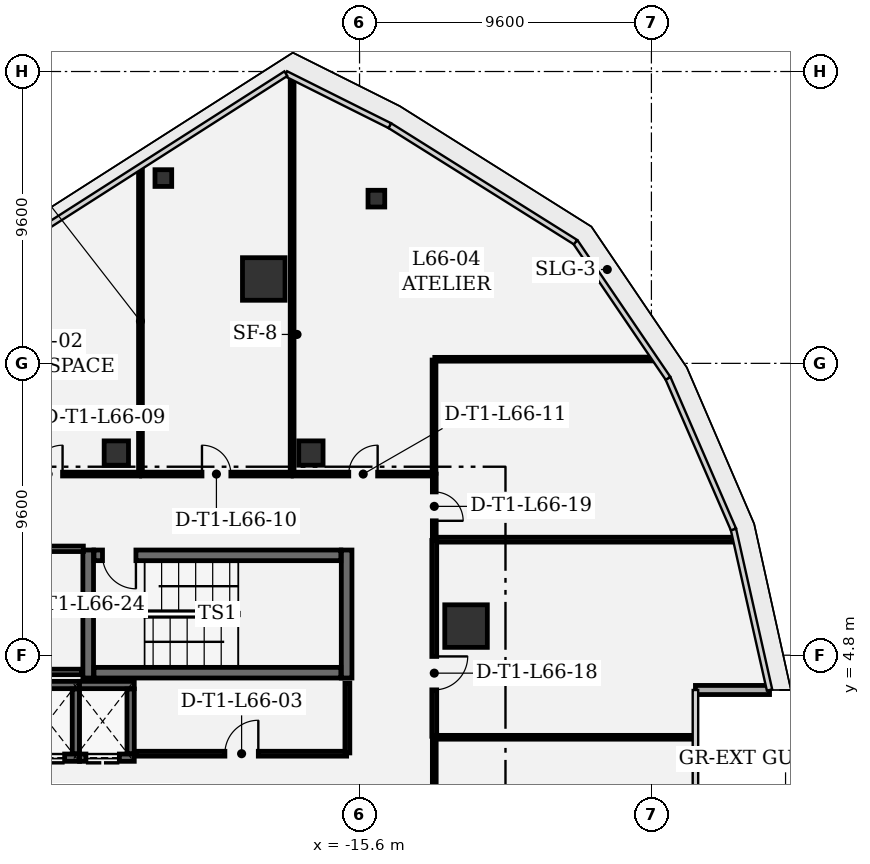
"""IFC4 building model, lengths in metres.
Left out: names, types, materials, properties, quantities, classifications, styles, units other than length and angle.
Written with IfcOpenShell. Run it as: python <this file> out.ifc"""

import sys

from ifc_helpers import new_model, si_unit, direction, frame, frame_2d, origin, origin_2d, place, context, subcontext, project, spatial, rectangle, extrude, element, fill, save


model = new_model("IFC4")
c1 = context("Model", 3, precision=1e-05, world=origin(), true_north=direction((0.0, 1.0)))
c2 = subcontext(c1, "Body", "Model", "MODEL_VIEW")
j1 = project(units=[si_unit("LENGTHUNIT", "METRE"), si_unit("PLANEANGLEUNIT", "RADIAN")], contexts=[c1])
p1 = place(None, origin())
s1 = spatial("IfcSite", under=j1, at=p1, CompositionType="ELEMENT")
p2 = place(p1, origin())
s2 = spatial("IfcBuilding", under=s1, at=p2, CompositionType="ELEMENT")
p3 = place(p2, frame((0.0, 0.0, 285.0)))
s3 = spatial("IfcBuildingStorey", under=s2, at=p3, CompositionType="ELEMENT", Elevation=285.0)
for number, where, z_axis, x_axis in (
    (1, (-12.097, 5.758, 0.0), (0.0, 0.0, 1.0), (1.0, 0.0, 0.0)),
    (2, (-18.75, 17.176, 0.0), (0.0, 0.0, 1.0), (1.0, 0.0, 0.0)),
):
    element("IfcColumn", number, at=place(p3, frame(where, z_axis=z_axis, x_axis=x_axis)), inside=s3, PredefinedType="COLUMN", context=c2, shape_type="SweptSolid", body=[
        extrude(rectangle(XDim=1.4, YDim=1.4, at=origin_2d()), origin(), (0.0, 0.0, 1.0), 4.2),
    ])
for number, where, z_axis, x_axis in (
    (3, (-23.6, 11.45, 0.0), (0.0, 0.0, 1.0), (1.0, 0.0, 0.0)),
    (4, (-17.2, 11.45, 0.0), (0.0, 0.0, 1.0), (1.0, 0.0, 0.0)),
):
    element("IfcColumn", number, at=place(p3, frame(where, z_axis=z_axis, x_axis=x_axis)), inside=s3, PredefinedType="COLUMN", context=c2, shape_type="SweptSolid", body=[
        extrude(rectangle(XDim=0.8, YDim=0.8, at=origin_2d()), origin(), (0.0, 0.0, 1.0), 4.2),
    ])
for number, where, z_axis, x_axis in (
    (5, (-22.053, 20.495, 0.0), (0.0, 0.0, 1.0), (1.0, 0.0, 0.0)),
    (6, (-15.046, 19.818, 0.0), (0.0, 0.0, 1.0), (1.0, 0.0, 0.0)),
):
    element("IfcColumn", number, at=place(p3, frame(where, z_axis=z_axis, x_axis=x_axis)), inside=s3, PredefinedType="COLUMN", context=c2, shape_type="SweptSolid", body=[
        extrude(rectangle(XDim=0.55, YDim=0.55, at=origin_2d()), origin(), (0.0, 0.0, 1.0), 4.2),
    ])
p4 = place(p3, frame((-4.552, 3.656, 0.0), z_axis=(0.0, 0.0, 1.0), x_axis=(1.0, 0.0, 0.0)))
e7 = element("IfcWall", 7, at=p4, inside=s3, PredefinedType="SOLIDWALL", context=c2, shape_type="SweptSolid", body=[
    extrude(rectangle(XDim=2.437, YDim=0.3, at=frame_2d((1.219, 0.0))), origin(), (0.0, 0.0, 1.0), 3.91),
])
for number, where, z_axis, x_axis in (
    (8, (-24.525, 8.26, 0.0), (0.0, 0.0, 1.0), (0.0, -1.0, 0.0)),
    (9, (-16.025, 4.05, 0.0), (0.0, 0.0, 1.0), (0.0, 1.0, 0.0)),
):
    element("IfcWall", number, at=place(p3, frame(where, z_axis=z_axis, x_axis=x_axis)), inside=s3, PredefinedType="SHEAR", context=c2, shape_type="SweptSolid", body=[
        extrude(rectangle(XDim=4.21, YDim=0.35, at=frame_2d((2.105, 0.0))), origin(), (0.0, 0.0, 1.0), 3.91),
    ])
p5 = place(p3, frame((-24.335, 4.225, 0.0), z_axis=(0.0, 0.0, 1.0), x_axis=(1.0, 0.0, 0.0)))
e10 = element("IfcWall", 10, at=p5, inside=s3, PredefinedType="SHEAR", context=c2, shape_type="SweptSolid", body=[
    extrude(rectangle(XDim=8.12, YDim=0.35, at=frame_2d((4.06, 0.0))), origin(), (0.0, 0.0, 1.0), 3.91),
])
p6 = place(p3, frame((-16.215, 8.085, 0.0), z_axis=(0.0, 0.0, 1.0), x_axis=(-1.0, 0.0, 0.0)))
e11 = element("IfcWall", 11, at=p6, inside=s3, PredefinedType="SHEAR", context=c2, shape_type="SweptSolid", body=[
    extrude(rectangle(XDim=8.12, YDim=0.35, at=frame_2d((4.06, 0.0))), origin(), (0.0, 0.0, 1.0), 3.91),
])
p7 = place(p6, frame((6.74, 0.0, 0.0)))
e12 = element("IfcOpeningElement", 12, at=p7, cuts=e11, PredefinedType="OPENING", context=c2, shape_type="SweptSolid", body=[
    extrude(rectangle(XDim=1.1, YDim=2.2, at=frame_2d((0.55, 1.1))), frame((0.0, 0.185, 0.0), z_axis=(0.0, -1.0, 0.0), x_axis=(1.0, 0.0, 0.0)), (0.0, 0.0, 1.0), 0.37),
])
p8 = place(p3, frame((-24.81, 1.43, 0.0), z_axis=(0.0, 0.0, 1.0), x_axis=(-1.0, 0.0, 0.0)))
e13 = element("IfcWall", 13, at=p8, inside=s3, PredefinedType="SHEAR", context=c2, shape_type="SweptSolid", body=[
    extrude(rectangle(XDim=2.08, YDim=0.24, at=frame_2d((1.04, 0.0))), origin(), (0.0, 0.0, 1.0), 3.91),
])
p9 = place(p8, frame((0.49, 0.0, 0.0)))
e14 = element("IfcOpeningElement", 14, at=p9, cuts=e13, PredefinedType="OPENING", context=c2, shape_type="SweptSolid", body=[
    extrude(rectangle(XDim=1.1, YDim=2.2, at=frame_2d((0.55, 1.1))), frame((0.0, 0.13, 0.0), z_axis=(0.0, -1.0, 0.0), x_axis=(1.0, 0.0, 0.0)), (0.0, 0.0, 1.0), 0.26),
])
p10 = place(p3, frame((-26.89, 3.82, 0.0), z_axis=(0.0, 0.0, 1.0), x_axis=(1.0, 0.0, 0.0)))
e15 = element("IfcWall", 15, at=p10, inside=s3, PredefinedType="SHEAR", context=c2, shape_type="SweptSolid", body=[
    extrude(rectangle(XDim=2.08, YDim=0.24, at=frame_2d((1.04, 0.0))), origin(), (0.0, 0.0, 1.0), 3.91),
])
p11 = place(p3, frame((-24.93, 3.688, 0.0), z_axis=(0.0, 0.0, 1.0), x_axis=(0.0, -1.0, 0.0)))
e16 = element("IfcWall", 16, at=p11, inside=s3, PredefinedType="SHEAR", context=c2, shape_type="SweptSolid", body=[
    extrude(rectangle(XDim=2.126, YDim=0.24, at=frame_2d((1.063, 0.0))), origin(), (0.0, 0.0, 1.0), 3.91),
])
p12 = place(p3, frame((-23.01, 1.43, 0.0), z_axis=(0.0, 0.0, 1.0), x_axis=(-1.0, 0.0, 0.0)))
e17 = element("IfcWall", 17, at=p12, inside=s3, PredefinedType="SHEAR", context=c2, shape_type="SweptSolid", body=[
    extrude(rectangle(XDim=1.8, YDim=0.24, at=frame_2d((0.9, 0.0))), origin(), (0.0, 0.0, 1.0), 3.91),
])
p13 = place(p12, frame((0.49, 0.0, 0.0)))
e18 = element("IfcOpeningElement", 18, at=p13, cuts=e17, PredefinedType="OPENING", context=c2, shape_type="SweptSolid", body=[
    extrude(rectangle(XDim=1.1, YDim=2.2, at=frame_2d((0.55, 1.1))), frame((0.0, 0.13, 0.0), z_axis=(0.0, -1.0, 0.0), x_axis=(1.0, 0.0, 0.0)), (0.0, 0.0, 1.0), 0.26),
])
p14 = place(p3, frame((-24.81, 3.82, 0.0), z_axis=(0.0, 0.0, 1.0), x_axis=(1.0, 0.0, 0.0)))
e19 = element("IfcWall", 19, at=p14, inside=s3, PredefinedType="SHEAR", context=c2, shape_type="SweptSolid", body=[
    extrude(rectangle(XDim=1.8, YDim=0.24, at=frame_2d((0.9, 0.0))), origin(), (0.0, 0.0, 1.0), 3.91),
])
p15 = place(p3, frame((-23.13, 3.688, 0.0), z_axis=(0.0, 0.0, 1.0), x_axis=(0.0, -1.0, 0.0)))
e20 = element("IfcWall", 20, at=p15, inside=s3, PredefinedType="SHEAR", context=c2, shape_type="SweptSolid", body=[
    extrude(rectangle(XDim=2.126, YDim=0.24, at=frame_2d((1.063, 0.0))), origin(), (0.0, 0.0, 1.0), 3.91),
])
p16 = place(p3, frame((-28.355, 4.25, 0.0), z_axis=(0.0, 0.0, 1.0), x_axis=(1.0, 0.0, 0.0)))
e21 = element("IfcWall", 21, at=p16, inside=s3, PredefinedType="PARTITIONING", context=c2, shape_type="SweptSolid", body=[
    extrude(rectangle(XDim=3.622, YDim=0.18, at=frame_2d((1.811, 0.0))), origin(), (0.0, 0.0, 1.0), 3.91),
])
p17 = place(p3, frame((-24.684, 8.3, 0.0), z_axis=(0.0, 0.0, 1.0), x_axis=(-1.0, 0.0, 0.0)))
e22 = element("IfcWall", 22, at=p17, inside=s3, PredefinedType="PARTITIONING", context=c2, shape_type="SweptSolid", body=[
    extrude(rectangle(XDim=3.671, YDim=0.18, at=frame_2d((1.835, 0.0))), origin(), (0.0, 0.0, 1.0), 3.529),
])
p18 = place(p17, frame((1.335, 0.0, 0.0)))
e23 = element("IfcOpeningElement", 23, at=p18, cuts=e22, PredefinedType="OPENING", context=c2, shape_type="SweptSolid", body=[
    extrude(rectangle(XDim=1.0, YDim=2.15, at=frame_2d((0.5, 1.075))), frame((0.0, 0.1, 0.0), z_axis=(0.0, -1.0, 0.0), x_axis=(1.0, 0.0, 0.0)), (0.0, 0.0, 1.0), 0.2),
])
p19 = place(p3, frame((-22.934, 1.56, 0.0), z_axis=(0.0, 0.0, 1.0), x_axis=(1.0, 0.0, 0.0)))
e24 = element("IfcWall", 24, at=p19, inside=s3, PredefinedType="PARTITIONING", context=c2, shape_type="SweptSolid", body=[
    extrude(rectangle(XDim=6.909, YDim=0.16, at=frame_2d((3.455, 0.0))), origin(), (0.0, 0.0, 1.0), 3.91),
])
p20 = place(p19, frame((2.905, 0.0, 0.0)))
e25 = element("IfcOpeningElement", 25, at=p20, cuts=e24, PredefinedType="OPENING", context=c2, shape_type="SweptSolid", body=[
    extrude(rectangle(XDim=1.1, YDim=2.15, at=frame_2d((0.55, 1.075))), frame((0.0, 0.09, 0.0), z_axis=(0.0, -1.0, 0.0), x_axis=(1.0, 0.0, 0.0)), (0.0, 0.0, 1.0), 0.18),
])
p21 = place(p3, frame((-16.0, 1.585, 0.0), z_axis=(0.0, 0.0, 1.0), x_axis=(0.0, 1.0, 0.0)))
e26 = element("IfcWall", 26, at=p21, inside=s3, PredefinedType="PARTITIONING", context=c2, shape_type="SweptSolid", body=[
    extrude(rectangle(XDim=2.302, YDim=0.16, at=frame_2d((1.151, 0.0))), origin(), (0.0, 0.0, 1.0), 3.91),
])
p22 = place(p3, frame((-28.855, 10.758, 0.0), z_axis=(0.0, 0.0, 1.0), x_axis=(1.0, 0.0, 0.0)))
e27 = element("IfcWall", 27, at=p22, inside=s3, PredefinedType="PARTITIONING", context=c2, shape_type="SweptSolid", body=[
    extrude(rectangle(XDim=6.025, YDim=0.125, at=frame_2d((3.012, 0.0))), origin(), (0.0, 0.0, 1.0), 3.13),
])
p23 = place(p22, frame((2.537, 0.0, 0.0)))
e28 = element("IfcOpeningElement", 28, at=p23, cuts=e27, PredefinedType="OPENING", context=c2, shape_type="SweptSolid", body=[
    extrude(rectangle(XDim=0.95, YDim=2.15, at=frame_2d((0.475, 1.075))), frame((0.0, 0.073, 0.0), z_axis=(0.0, -1.0, 0.0), x_axis=(1.0, 0.0, 0.0)), (0.0, 0.0, 1.0), 0.145),
])
p24 = place(p3, frame((-22.806, 10.783, 0.0), z_axis=(0.0, 0.0, 1.0), x_axis=(0.0, 1.0, 0.0)))
e29 = element("IfcWall", 29, at=p24, inside=s3, PredefinedType="PARTITIONING", context=c2, shape_type="SweptSolid", body=[
    extrude(rectangle(XDim=10.009, YDim=0.125, at=frame_2d((5.004, 0.0))), origin(), (0.0, 0.0, 1.0), 3.91),
])
p25 = place(p3, frame((-22.773, 10.758, 0.0), z_axis=(0.0, 0.0, 1.0), x_axis=(1.0, 0.0, 0.0)))
e30 = element("IfcWall", 30, at=p25, inside=s3, PredefinedType="PARTITIONING", context=c2, shape_type="SweptSolid", body=[
    extrude(rectangle(XDim=4.931, YDim=0.125, at=frame_2d((2.465, 0.0))), origin(), (0.0, 0.0, 1.0), 3.529),
])
p26 = place(p25, frame((1.99, 0.0, 0.0)))
e31 = element("IfcOpeningElement", 31, at=p26, cuts=e30, PredefinedType="OPENING", context=c2, shape_type="SweptSolid", body=[
    extrude(rectangle(XDim=0.95, YDim=2.15, at=frame_2d((0.475, 1.075))), frame((0.0, 0.073, 0.0), z_axis=(0.0, -1.0, 0.0), x_axis=(1.0, 0.0, 0.0)), (0.0, 0.0, 1.0), 0.145),
])
p27 = place(p3, frame((-17.817, 10.783, 0.0), z_axis=(0.0, 0.0, 1.0), x_axis=(0.0, 1.0, 0.0)))
e32 = element("IfcWall", 32, at=p27, inside=s3, PredefinedType="PARTITIONING", context=c2, shape_type="SweptSolid", body=[
    extrude(rectangle(XDim=12.962, YDim=0.125, at=frame_2d((6.481, 0.0))), origin(), (0.0, 0.0, 1.0), 3.13),
])
p28 = place(p3, frame((-17.785, 10.758, 0.0), z_axis=(0.0, 0.0, 1.0), x_axis=(1.0, 0.0, 0.0)))
e33 = element("IfcWall", 33, at=p28, inside=s3, PredefinedType="PARTITIONING", context=c2, shape_type="SweptSolid", body=[
    extrude(rectangle(XDim=4.61, YDim=0.125, at=frame_2d((2.305, 0.0))), origin(), (0.0, 0.0, 1.0), 3.529),
])
p29 = place(p28, frame((1.83, 0.0, 0.0)))
e34 = element("IfcOpeningElement", 34, at=p29, cuts=e33, PredefinedType="OPENING", context=c2, shape_type="SweptSolid", body=[
    extrude(rectangle(XDim=0.95, YDim=2.15, at=frame_2d((0.475, 1.075))), frame((0.0, 0.073, 0.0), z_axis=(0.0, -1.0, 0.0), x_axis=(1.0, 0.0, 0.0)), (0.0, 0.0, 1.0), 0.145),
])
p30 = place(p3, frame((-13.15, 10.783, 0.0), z_axis=(0.0, 0.0, 1.0), x_axis=(0.0, 1.0, 0.0)))
e35 = element("IfcWall", 35, at=p30, inside=s3, PredefinedType="PARTITIONING", context=c2, shape_type="SweptSolid", body=[
    extrude(rectangle(XDim=3.726, YDim=0.125, at=frame_2d((1.863, 0.0))), origin(), (0.0, 0.0, 1.0), 3.91),
])
p31 = place(p3, frame((-13.125, 14.534, 0.0), z_axis=(0.0, 0.0, 1.0), x_axis=(0.999999160366, 0.001295865779, 0.0)))
e36 = element("IfcWall", 36, at=p31, inside=s3, PredefinedType="PARTITIONING", context=c2, shape_type="SweptSolid", body=[
    extrude(rectangle(XDim=7.159, YDim=0.125, at=frame_2d((3.58, 0.0))), origin(), (0.0, 0.0, 1.0), 3.91),
])
p32 = place(p3, frame((-4.632, 2.101, 0.0), z_axis=(0.0, 0.0, 1.0), x_axis=(-1.0, 0.0, 0.0)))
e37 = element("IfcWall", 37, at=p32, inside=s3, PredefinedType="PARTITIONING", context=c2, shape_type="SweptSolid", body=[
    extrude(rectangle(XDim=8.485, YDim=0.125, at=frame_2d((4.243, 0.0))), origin(), (0.0, 0.0, 1.0), 3.91),
])
p33 = place(p3, frame((-13.142, 2.076, 0.0), z_axis=(0.0, 0.0, 1.0), x_axis=(0.0, -1.0, 0.0)))
e38 = element("IfcWall", 38, at=p33, inside=s3, PredefinedType="PARTITIONING", context=c2, shape_type="SweptSolid", body=[
    extrude(rectangle(XDim=7.493, YDim=0.125, at=frame_2d((3.746, 0.0))), origin(), (0.0, 0.0, 1.0), 3.91),
])
p34 = place(p33, frame((3.271, 0.0, 0.0)))
e39 = element("IfcOpeningElement", 39, at=p34, cuts=e38, PredefinedType="OPENING", context=c2, shape_type="SweptSolid", body=[
    extrude(rectangle(XDim=0.95, YDim=2.15, at=frame_2d((0.475, 1.075))), frame((0.0, 0.073, 0.0), z_axis=(0.0, -1.0, 0.0), x_axis=(1.0, 0.0, 0.0)), (0.0, 0.0, 1.0), 0.145),
])
p35 = place(p3, frame((-3.305, 8.601, 0.0), z_axis=(0.0, 0.0, 1.0), x_axis=(-1.0, 0.0, 0.0)))
e40 = element("IfcWall", 40, at=p35, inside=s3, PredefinedType="PARTITIONING", context=c2, shape_type="SweptSolid", body=[
    extrude(rectangle(XDim=9.812, YDim=0.16, at=frame_2d((4.906, 0.0))), origin(), (0.0, 0.0, 1.0), 3.91),
])
p36 = place(p3, frame((-13.142, 8.576, 0.0), z_axis=(0.0, 0.0, 1.0), x_axis=(0.0, -1.0, 0.0)))
e41 = element("IfcWall", 41, at=p36, inside=s3, PredefinedType="PARTITIONING", context=c2, shape_type="SweptSolid", body=[
    extrude(rectangle(XDim=6.442, YDim=0.16, at=frame_2d((3.221, 0.0))), origin(), (0.0, 0.0, 1.0), 3.13),
])
p37 = place(p36, frame((3.816, 0.0, 0.0)))
e42 = element("IfcOpeningElement", 42, at=p37, cuts=e41, PredefinedType="OPENING", context=c2, shape_type="SweptSolid", body=[
    extrude(rectangle(XDim=1.1, YDim=2.15, at=frame_2d((0.55, 1.075))), frame((0.0, 0.09, 0.0), z_axis=(0.0, -1.0, 0.0), x_axis=(1.0, 0.0, 0.0)), (0.0, 0.0, 1.0), 0.18),
])
p38 = place(p3, frame((-13.142, 10.758, 0.0), z_axis=(0.0, 0.0, 1.0), x_axis=(0.0, -1.0, 0.0)))
e43 = element("IfcWall", 43, at=p38, inside=s3, PredefinedType="PARTITIONING", context=c2, shape_type="SweptSolid", body=[
    extrude(rectangle(XDim=2.125, YDim=0.125, at=frame_2d((1.062, 0.0))), origin(), (0.0, 0.0, 1.0), 3.91),
])
p39 = place(p38, frame((0.587, 0.0, 0.0)))
e44 = element("IfcOpeningElement", 44, at=p39, cuts=e43, PredefinedType="OPENING", context=c2, shape_type="SweptSolid", body=[
    extrude(rectangle(XDim=0.95, YDim=2.15, at=frame_2d((0.475, 1.075))), frame((0.0, 0.073, 0.0), z_axis=(0.0, -1.0, 0.0), x_axis=(1.0, 0.0, 0.0)), (0.0, 0.0, 1.0), 0.145),
])
p40 = place(p7, origin())
e45 = element("IfcDoor", 45, at=p40, inside=s3, OperationType="SINGLE_SWING_LEFT", PredefinedType="DOOR", context=c2, shape_type="SweptSolid", body=[
    extrude(rectangle(XDim=1.1, YDim=2.2, at=frame_2d((0.55, 1.1))), frame((0.0, 0.025, 0.0), z_axis=(0.0, -1.0, 0.0), x_axis=(1.0, 0.0, 0.0)), (0.0, 0.0, 1.0), 0.05),
])
fill(e12, e45)
p41 = place(p9, origin())
e46 = element("IfcDoor", 46, at=p41, inside=s3, OperationType="DOUBLE_DOOR_SLIDING", PredefinedType="DOOR", context=c2, shape_type="SweptSolid", body=[
    extrude(rectangle(XDim=1.1, YDim=2.2, at=frame_2d((0.55, 1.1))), frame((0.0, 0.025, 0.0), z_axis=(0.0, -1.0, 0.0), x_axis=(1.0, 0.0, 0.0)), (0.0, 0.0, 1.0), 0.05),
])
fill(e14, e46)
p42 = place(p13, origin())
e47 = element("IfcDoor", 47, at=p42, inside=s3, OperationType="DOUBLE_DOOR_SLIDING", PredefinedType="DOOR", context=c2, shape_type="SweptSolid", body=[
    extrude(rectangle(XDim=1.1, YDim=2.2, at=frame_2d((0.55, 1.1))), frame((0.0, 0.025, 0.0), z_axis=(0.0, -1.0, 0.0), x_axis=(1.0, 0.0, 0.0)), (0.0, 0.0, 1.0), 0.05),
])
fill(e18, e47)
p43 = place(p20, origin())
e48 = element("IfcDoor", 48, at=p43, inside=s3, OperationType="SINGLE_SWING_RIGHT", PredefinedType="DOOR", context=c2, shape_type="SweptSolid", body=[
    extrude(rectangle(XDim=1.1, YDim=2.15, at=frame_2d((0.55, 1.075))), frame((0.0, 0.025, 0.0), z_axis=(0.0, -1.0, 0.0), x_axis=(1.0, 0.0, 0.0)), (0.0, 0.0, 1.0), 0.05),
])
fill(e25, e48)
p44 = place(p23, origin())
e49 = element("IfcDoor", 49, at=p44, inside=s3, OperationType="SINGLE_SWING_RIGHT", PredefinedType="DOOR", context=c2, shape_type="SweptSolid", body=[
    extrude(rectangle(XDim=0.95, YDim=2.15, at=frame_2d((0.475, 1.075))), frame((0.0, 0.025, 0.0), z_axis=(0.0, -1.0, 0.0), x_axis=(1.0, 0.0, 0.0)), (0.0, 0.0, 1.0), 0.05),
])
fill(e28, e49)
p45 = place(p26, origin())
e50 = element("IfcDoor", 50, at=p45, inside=s3, OperationType="SINGLE_SWING_LEFT", PredefinedType="DOOR", context=c2, shape_type="SweptSolid", body=[
    extrude(rectangle(XDim=0.95, YDim=2.15, at=frame_2d((0.475, 1.075))), frame((0.0, 0.025, 0.0), z_axis=(0.0, -1.0, 0.0), x_axis=(1.0, 0.0, 0.0)), (0.0, 0.0, 1.0), 0.05),
])
fill(e31, e50)
p46 = place(p29, origin())
e51 = element("IfcDoor", 51, at=p46, inside=s3, OperationType="SINGLE_SWING_RIGHT", PredefinedType="DOOR", context=c2, shape_type="SweptSolid", body=[
    extrude(rectangle(XDim=0.95, YDim=2.15, at=frame_2d((0.475, 1.075))), frame((0.0, 0.025, 0.0), z_axis=(0.0, -1.0, 0.0), x_axis=(1.0, 0.0, 0.0)), (0.0, 0.0, 1.0), 0.05),
])
fill(e34, e51)
p47 = place(p37, origin())
e52 = element("IfcDoor", 52, at=p47, inside=s3, OperationType="SINGLE_SWING_LEFT", PredefinedType="DOOR", context=c2, shape_type="SweptSolid", body=[
    extrude(rectangle(XDim=1.1, YDim=2.15, at=frame_2d((0.55, 1.075))), frame((0.0, 0.025, 0.0), z_axis=(0.0, -1.0, 0.0), x_axis=(1.0, 0.0, 0.0)), (0.0, 0.0, 1.0), 0.05),
])
fill(e42, e52)
p48 = place(p39, origin())
e53 = element("IfcDoor", 53, at=p48, inside=s3, OperationType="SINGLE_SWING_RIGHT", PredefinedType="DOOR", context=c2, shape_type="SweptSolid", body=[
    extrude(rectangle(XDim=0.95, YDim=2.15, at=frame_2d((0.475, 1.075))), frame((0.0, 0.025, 0.0), z_axis=(0.0, -1.0, 0.0), x_axis=(1.0, 0.0, 0.0)), (0.0, 0.0, 1.0), 0.05),
])
fill(e44, e53)
save(model, sys.argv[1])
